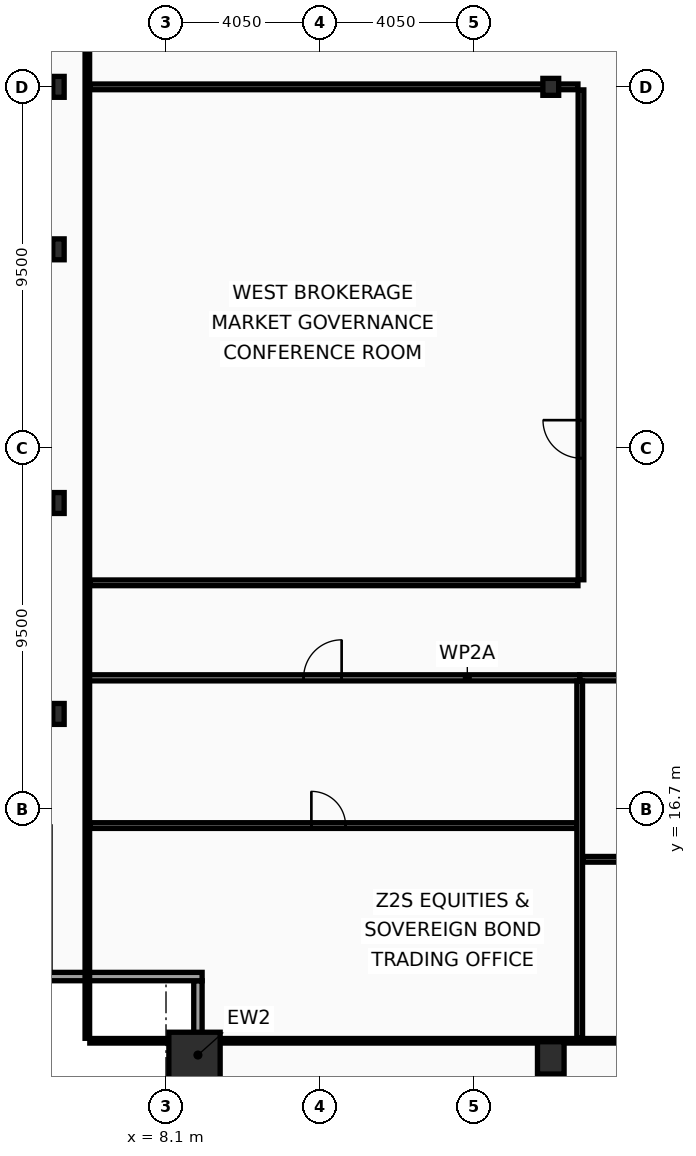
"""IFC4 building model, lengths in metres.
Left out: names, types, materials, properties, quantities, classifications, styles, units other than length and angle.
Written with IfcOpenShell. Run it as: python <this file> out.ifc"""

import sys

from ifc_helpers import new_model, si_unit, direction, frame, frame_2d, origin, origin_2d, place, context, subcontext, project, spatial, rectangle, hollow_rectangle, i_section, extrude, element, fill, save


model = new_model("IFC4")
c1 = context("Model", 3, precision=1e-05, world=origin(), true_north=direction((0.0, 1.0)))
c2 = subcontext(c1, "Body", "Model", "MODEL_VIEW")
j1 = project(units=[si_unit("LENGTHUNIT", "METRE"), si_unit("PLANEANGLEUNIT", "RADIAN")], contexts=[c1])
p1 = place(None, origin())
s1 = spatial("IfcSite", under=j1, at=p1, CompositionType="ELEMENT")
p2 = place(p1, origin())
s2 = spatial("IfcBuilding", under=s1, at=p2, CompositionType="ELEMENT")
p3 = place(p2, frame((0.0, 0.0, 154.2)))
s3 = spatial("IfcBuildingStorey", under=s2, at=p3, CompositionType="ELEMENT", Elevation=154.2)
p4 = place(p3, frame((8.85, 10.15, 0.0), z_axis=(0.0, 0.0, 1.0), x_axis=(1.0, 0.0, 0.0)))
e1 = element("IfcColumn", 1, at=p4, inside=s3, PredefinedType="COLUMN", context=c2, shape_type="SweptSolid", body=[
    extrude(hollow_rectangle(XDim=1.35, YDim=1.35, WallThickness=0.065, at=origin_2d()), origin(), (0.0, 0.0, 1.0), 3.6),
])
p5 = place(p3, frame((18.225, 10.15, 0.0), z_axis=(0.0, 0.0, 1.0), x_axis=(1.0, 0.0, 0.0)))
e2 = element("IfcColumn", 2, at=p5, inside=s3, PredefinedType="COLUMN", context=c2, shape_type="SweptSolid", body=[
    extrude(hollow_rectangle(XDim=0.7, YDim=0.85, WallThickness=0.05, at=origin_2d()), origin(), (0.0, 0.0, 1.0), 3.6),
])
for number, where, z_axis, x_axis in (
    (3, (5.27, 19.2, 0.0), (0.0, 0.0, 1.0), (1.0, 0.0, 0.0)),
    (4, (5.27, 24.75, 0.0), (0.0, 0.0, 1.0), (1.0, 0.0, 0.0)),
    (5, (5.27, 31.425, 0.0), (0.0, 0.0, 1.0), (1.0, 0.0, 0.0)),
    (6, (5.27, 35.7, 0.0), (0.0, 0.0, 1.0), (1.0, 0.0, 0.0)),
):
    element("IfcColumn", number, at=place(p3, frame(where, z_axis=z_axis, x_axis=x_axis)), inside=s3, PredefinedType="COLUMN", context=c2, shape_type="SweptSolid", body=[
        extrude(i_section(OverallWidth=0.3, OverallDepth=0.55, WebThickness=0.015, FlangeThickness=0.029, at=origin_2d()), origin(), (0.0, 0.0, 1.0), 3.6),
    ])
p6 = place(p3, frame((18.225, 35.7, 0.0), z_axis=(0.0, 0.0, 1.0), x_axis=(1.0, 0.0, 0.0)))
e7 = element("IfcColumn", 7, at=p6, inside=s3, PredefinedType="COLUMN", context=c2, shape_type="SweptSolid", body=[
    extrude(i_section(OverallWidth=0.416, OverallDepth=0.446, WebThickness=0.039, FlangeThickness=0.063, at=origin_2d()), origin(), (0.0, 0.0, 1.0), 3.6),
])
p7 = place(p3, frame((8.94, 8.27, 0.0), z_axis=(0.0, 0.0, 1.0), x_axis=(0.0, 1.0, 0.0)))
e8 = element("IfcWall", 8, at=p7, inside=s3, PredefinedType="SOLIDWALL", context=c2, shape_type="SweptSolid", body=[
    extrude(rectangle(XDim=3.91, YDim=0.22, at=frame_2d((1.955, 0.0))), origin(), (0.0, 0.0, 1.0), 2.83),
])
p8 = place(p3, frame((9.05, 12.29, 0.0), z_axis=(0.0, 0.0, 1.0), x_axis=(-1.0, 0.0, 0.0)))
e9 = element("IfcWall", 9, at=p8, inside=s3, PredefinedType="SOLIDWALL", context=c2, shape_type="SweptSolid", body=[
    extrude(rectangle(XDim=4.22, YDim=0.22, at=frame_2d((2.11, 0.0))), origin(), (0.0, 0.0, 1.0), 2.83),
])
p9 = place(p3, frame((6.03, 20.15, 0.0), z_axis=(0.0, 0.0, 1.0), x_axis=(1.0, 0.0, 0.0)))
e10 = element("IfcWall", 10, at=p9, inside=s3, PredefinedType="PARTITIONING", context=c2, shape_type="SweptSolid", body=[
    extrude(rectangle(XDim=12.956, YDim=0.16, at=frame_2d((6.478, 0.0))), origin(), (0.0, 0.0, 1.0), 2.73),
])
p10 = place(p9, frame((5.691, 0.0, 0.0)))
e11 = element("IfcOpeningElement", 11, at=p10, cuts=e10, PredefinedType="OPENING", context=c2, shape_type="SweptSolid", body=[
    extrude(rectangle(XDim=1.0, YDim=2.05, at=frame_2d((0.5, 1.025))), frame((0.0, 0.09, 0.0), z_axis=(0.0, -1.0, 0.0), x_axis=(1.0, 0.0, 0.0)), (0.0, 0.0, 1.0), 0.18),
])
p11 = place(p3, frame((6.095, 16.263, 0.0), z_axis=(0.0, 0.0, 1.0), x_axis=(1.0, 0.0, 0.0)))
e12 = element("IfcWall", 12, at=p11, inside=s3, PredefinedType="PARTITIONING", context=c2, shape_type="SweptSolid", body=[
    extrude(rectangle(XDim=12.811, YDim=0.15, at=frame_2d((6.406, 0.0))), origin(), (0.0, 0.0, 1.0), 2.73),
])
p12 = place(p11, frame((5.83, 0.0, 0.0)))
e13 = element("IfcOpeningElement", 13, at=p12, cuts=e12, PredefinedType="OPENING", context=c2, shape_type="SweptSolid", body=[
    extrude(rectangle(XDim=0.9, YDim=2.05, at=frame_2d((0.45, 1.025))), frame((0.0, 0.085, 0.0), z_axis=(0.0, -1.0, 0.0), x_axis=(1.0, 0.0, 0.0)), (0.0, 0.0, 1.0), 0.17),
])
p13 = place(p3, frame((18.986, 20.15, 0.0), z_axis=(0.0, 0.0, 1.0), x_axis=(1.0, 0.0, 0.0)))
e14 = element("IfcWall", 14, at=p13, inside=s3, PredefinedType="PARTITIONING", context=c2, shape_type="SweptSolid", body=[
    extrude(rectangle(XDim=13.739, YDim=0.16, at=frame_2d((6.869, 0.0))), origin(), (0.0, 0.0, 1.0), 2.73),
])
p14 = place(p13, frame((6.02, 0.0, 0.0)))
e15 = element("IfcOpeningElement", 15, at=p14, cuts=e14, PredefinedType="OPENING", context=c2, shape_type="SweptSolid", body=[
    extrude(rectangle(XDim=1.0, YDim=2.05, at=frame_2d((0.5, 1.025))), frame((0.0, 0.09, 0.0), z_axis=(0.0, -1.0, 0.0), x_axis=(1.0, 0.0, 0.0)), (0.0, 0.0, 1.0), 0.18),
])
p15 = place(p3, frame((18.986, 10.665, 0.0), z_axis=(0.0, 0.0, 1.0), x_axis=(0.0, 1.0, 0.0)))
e16 = element("IfcWall", 16, at=p15, inside=s3, PredefinedType="PARTITIONING", context=c2, shape_type="SweptSolid", body=[
    extrude(rectangle(XDim=9.4, YDim=0.15, at=frame_2d((4.7, 0.0))), origin(), (0.0, 0.0, 1.0), 2.93),
])
p16 = place(p3, frame((19.066, 15.375, 0.0), z_axis=(0.0, 0.0, 1.0), x_axis=(1.0, 0.0, 0.0)))
e17 = element("IfcWall", 17, at=p16, inside=s3, PredefinedType="PARTITIONING", context=c2, shape_type="SweptSolid", body=[
    extrude(rectangle(XDim=13.579, YDim=0.15, at=frame_2d((6.79, 0.0))), origin(), (0.0, 0.0, 1.0), 2.73),
])
p17 = place(p16, frame((6.183, 0.0, 0.0)))
e18 = element("IfcOpeningElement", 18, at=p17, cuts=e17, PredefinedType="OPENING", context=c2, shape_type="SweptSolid", body=[
    extrude(rectangle(XDim=0.9, YDim=2.05, at=frame_2d((0.45, 1.025))), frame((0.0, 0.085, 0.0), z_axis=(0.0, -1.0, 0.0), x_axis=(1.0, 0.0, 0.0)), (0.0, 0.0, 1.0), 0.17),
])
p18 = place(p3, frame((19.02, 22.73, 0.0), z_axis=(0.0, 0.0, 1.0), x_axis=(0.0, 1.0, 0.0)))
e19 = element("IfcWall", 19, at=p18, inside=s3, PredefinedType="PARTITIONING", context=c2, shape_type="SweptSolid", body=[
    extrude(rectangle(XDim=12.89, YDim=0.15, at=frame_2d((6.445, 0.0))), origin(), (0.0, 0.0, 1.0), 2.93),
])
p19 = place(p18, frame((3.2, 0.0, 0.0)))
e20 = element("IfcOpeningElement", 20, at=p19, cuts=e19, PredefinedType="OPENING", context=c2, shape_type="SweptSolid", body=[
    extrude(rectangle(XDim=1.0, YDim=2.05, at=frame_2d((0.5, 1.025))), frame((0.0, 0.085, 0.0), z_axis=(0.0, -1.0, 0.0), x_axis=(1.0, 0.0, 0.0)), (0.0, 0.0, 1.0), 0.17),
])
for number, where, z_axis, x_axis in (
    (21, (6.095, 22.65, 0.0), (0.0, 0.0, 1.0), (1.0, 0.0, 0.0)),
    (22, (6.095, 35.7, 0.0), (0.0, 0.0, 1.0), (1.0, 0.0, 0.0)),
):
    element("IfcWall", number, at=place(p3, frame(where, z_axis=z_axis, x_axis=x_axis)), inside=s3, PredefinedType="PARTITIONING", context=c2, shape_type="SweptSolid", body=[
        extrude(rectangle(XDim=12.845, YDim=0.15, at=frame_2d((6.422, 0.0))), origin(), (0.0, 0.0, 1.0), 2.73),
    ])
p20 = place(p3, frame((6.03, 10.665, 0.0), z_axis=(0.0, 0.0, 1.0), x_axis=(0.0, 1.0, 0.0)))
e23 = element("IfcWall", 23, at=p20, inside=s3, PredefinedType="PARTITIONING", context=c2, shape_type="SweptSolid", body=[
    extrude(rectangle(XDim=42.11, YDim=0.12, at=frame_2d((21.055, 0.0))), origin(), (0.0, 0.0, 1.0), 2.73),
])
p21 = place(p3, frame((6.095, 10.6, 0.0), z_axis=(0.0, 0.0, 1.0), x_axis=(1.0, 0.0, 0.0)))
e24 = element("IfcWall", 24, at=p21, inside=s3, PredefinedType="PARTITIONING", context=c2, shape_type="SweptSolid", body=[
    extrude(rectangle(XDim=60.71, YDim=0.12, at=frame_2d((30.355, 0.0))), origin(), (0.0, 0.0, 1.0), 2.73),
])
p22 = place(p10, origin())
e25 = element("IfcDoor", 25, at=p22, inside=s3, OperationType="SINGLE_SWING_RIGHT", PredefinedType="DOOR", context=c2, shape_type="SweptSolid", body=[
    extrude(rectangle(XDim=1.0, YDim=2.05, at=frame_2d((0.5, 1.025))), frame((0.0, 0.025, 0.0), z_axis=(0.0, -1.0, 0.0), x_axis=(1.0, 0.0, 0.0)), (0.0, 0.0, 1.0), 0.05),
])
fill(e11, e25)
p23 = place(p12, origin())
e26 = element("IfcDoor", 26, at=p23, inside=s3, OperationType="SINGLE_SWING_LEFT", PredefinedType="DOOR", context=c2, shape_type="SweptSolid", body=[
    extrude(rectangle(XDim=0.9, YDim=2.05, at=frame_2d((0.45, 1.025))), frame((0.0, 0.025, 0.0), z_axis=(0.0, -1.0, 0.0), x_axis=(1.0, 0.0, 0.0)), (0.0, 0.0, 1.0), 0.05),
])
fill(e13, e26)
p24 = place(p19, origin())
e27 = element("IfcDoor", 27, at=p24, inside=s3, OperationType="SINGLE_SWING_RIGHT", PredefinedType="DOOR", context=c2, shape_type="SweptSolid", body=[
    extrude(rectangle(XDim=1.0, YDim=2.05, at=frame_2d((0.5, 1.025))), frame((0.0, 0.025, 0.0), z_axis=(0.0, -1.0, 0.0), x_axis=(1.0, 0.0, 0.0)), (0.0, 0.0, 1.0), 0.05),
])
fill(e20, e27)
save(model, sys.argv[1])
